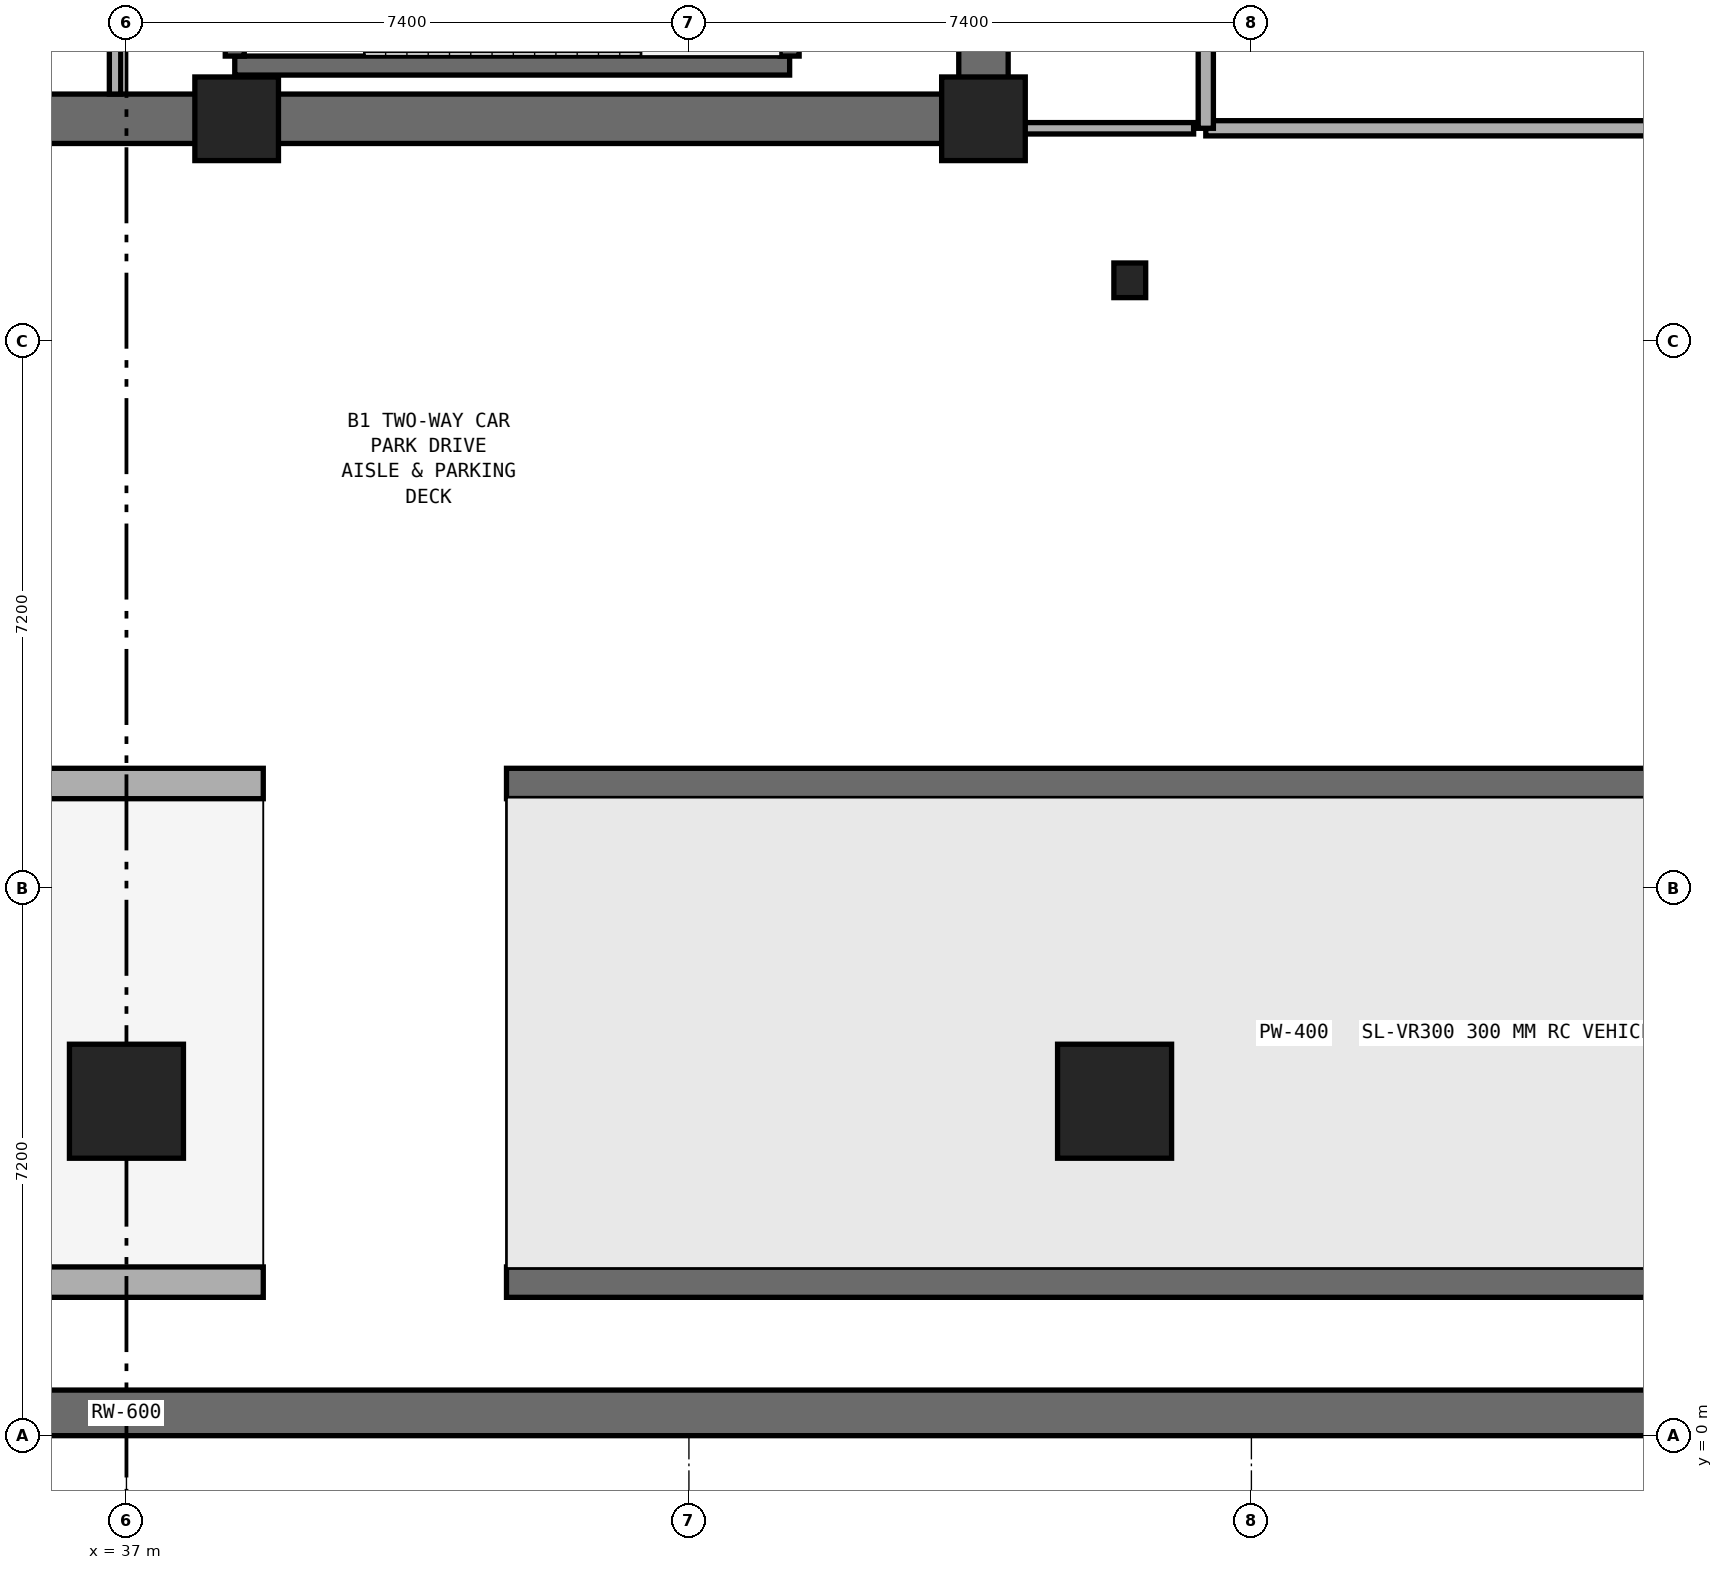
"""IFC4 building model, lengths in metres.
Left out: names, types, materials, properties, quantities, classifications, styles, units other than length and angle.
Written with IfcOpenShell. Run it as: python <this file> out.ifc"""

import sys

from ifc_helpers import new_model, si_unit, direction, frame, frame_2d, origin, origin_2d, place, context, subcontext, project, spatial, rectangle, i_section, extrude, element, save


model = new_model("IFC4")
c1 = context("Model", 3, precision=1e-05, world=origin(), true_north=direction((0.0, 1.0)))
c2 = subcontext(c1, "Body", "Model", "MODEL_VIEW")
j1 = project(units=[si_unit("LENGTHUNIT", "METRE"), si_unit("PLANEANGLEUNIT", "RADIAN")], contexts=[c1])
p1 = place(None, origin())
s1 = spatial("IfcSite", under=j1, at=p1, CompositionType="ELEMENT")
p2 = place(p1, origin())
s2 = spatial("IfcBuilding", under=s1, at=p2, CompositionType="ELEMENT")
p3 = place(p2, frame((0.0, 0.0, -4.8)))
s3 = spatial("IfcBuildingStorey", under=s2, at=p3, CompositionType="ELEMENT", Elevation=-4.8)
p4 = place(p3, frame((25.4, 17.325, 0.0), z_axis=(0.0, 0.0, 1.0), x_axis=(1.0, 0.0, 0.0)))
e1 = element("IfcWall", 1, at=p4, inside=s3, PredefinedType="SHEAR", context=c2, shape_type="SweptSolid", body=[
    extrude(rectangle(XDim=23.2, YDim=0.65, at=frame_2d((11.6, 0.0))), origin(), (0.0, 0.0, 1.0), 4.45),
])
p5 = place(p3, frame((48.275, 17.65, 0.0), z_axis=(0.0, 0.0, 1.0), x_axis=(0.0, 1.0, 0.0)))
e2 = element("IfcWall", 2, at=p5, inside=s3, PredefinedType="SHEAR", context=c2, shape_type="SweptSolid", body=[
    extrude(rectangle(XDim=15.1, YDim=0.65, at=frame_2d((7.55, 0.0))), origin(), (0.0, 0.0, 1.0), 4.45),
])
p6 = place(p5, frame((5.65, 0.0, 0.0)))
e3 = element("IfcOpeningElement", 3, at=p6, cuts=e2, PredefinedType="OPENING", context=c2, shape_type="SweptSolid", body=[
    extrude(rectangle(XDim=1.5, YDim=2.15, at=frame_2d((0.75, 1.075))), frame((0.0, 0.335, 0.0), z_axis=(0.0, -1.0, 0.0), x_axis=(1.0, 0.0, 0.0)), (0.0, 0.0, 1.0), 0.67),
])
p7 = place(p3, frame((0.0, 0.3, 0.0), z_axis=(0.0, 0.0, 1.0), x_axis=(1.0, 0.0, 0.0)))
e4 = element("IfcWall", 4, at=p7, inside=s3, PredefinedType="SOLIDWALL", context=c2, shape_type="SweptSolid", body=[
    extrude(rectangle(XDim=74.0, YDim=0.6, at=frame_2d((37.0, 0.0))), origin(), (0.0, 0.0, 1.0), 4.45),
])
for number, where, z_axis, x_axis in (
    (5, (38.45, 17.325, 0.0), (0.0, 0.0, 1.0), (1.0, 0.0, 0.0)),
    (6, (48.275, 17.325, 0.0), (0.0, 0.0, 1.0), (1.0, 0.0, 0.0)),
):
    element("IfcColumn", number, at=place(p3, frame(where, z_axis=z_axis, x_axis=x_axis)), inside=s3, PredefinedType="PILASTER", context=c2, shape_type="SweptSolid", body=[
        extrude(rectangle(XDim=1.1, YDim=1.1, at=origin_2d()), origin(), (0.0, 0.0, 1.0), 4.8),
    ])
for number, where, z_axis, x_axis in (
    (7, (37.0, 4.4, 0.0), (0.0, 0.0, 1.0), (1.0, 0.0, 0.0)),
    (8, (50.0, 4.4, 0.0), (0.0, 0.0, 1.0), (1.0, 0.0, 0.0)),
):
    element("IfcColumn", number, at=place(p3, frame(where, z_axis=z_axis, x_axis=x_axis)), inside=s3, PredefinedType="COLUMN", context=c2, shape_type="SweptSolid", body=[
        extrude(rectangle(XDim=1.5, YDim=1.5, at=origin_2d()), origin(), (0.0, 0.0, 1.0), 4.8),
    ])
p8 = place(p3, frame((50.2, 15.2, 0.0), z_axis=(0.0, 0.0, 1.0), x_axis=(1.0, 0.0, 0.0)))
e9 = element("IfcColumn", 9, at=p8, inside=s3, PredefinedType="COLUMN", context=c2, shape_type="SweptSolid", body=[
    extrude(i_section(OverallWidth=0.418, OverallDepth=0.456, WebThickness=0.042, FlangeThickness=0.067, at=origin_2d()), origin(), (0.0, 0.0, 1.0), 4.8),
])
for number, where, z_axis, x_axis in (
    (10, (9.82, 2.02, 0.0), (0.0, 0.0, 1.0), (1.0, 0.0, 0.0)),
    (11, (9.82, 8.58, 0.0), (0.0, 0.0, 1.0), (1.0, 0.0, 0.0)),
):
    element("IfcWall", number, at=place(p3, frame(where, z_axis=z_axis, x_axis=x_axis)), inside=s3, PredefinedType="SOLIDWALL", context=c2, shape_type="SweptSolid", body=[
        extrude(rectangle(XDim=28.98, YDim=0.4, at=frame_2d((14.49, 0.0))), origin(), (0.0, 0.0, 1.0), 1.18),
    ])
p9 = place(p3, frame((52.64, 2.35, 0.0), z_axis=(0.0, 0.0, 1.0), x_axis=(0.0, 1.0, 0.0)))
e12 = element("IfcWall", 12, at=p9, inside=s3, PredefinedType="SOLIDWALL", context=c2, shape_type="SweptSolid", body=[
    extrude(rectangle(XDim=5.9, YDim=0.4, at=frame_2d((2.95, 0.0))), origin(), (0.0, 0.0, 1.0), 1.504),
])
for number, where, z_axis, x_axis in (
    (13, (42.0, 2.02, 0.0), (0.0, 0.0, 1.0), (1.0, 0.0, 0.0)),
    (14, (42.0, 8.58, 0.0), (0.0, 0.0, 1.0), (1.0, 0.0, 0.0)),
):
    element("IfcWall", number, at=place(p3, frame(where, z_axis=z_axis, x_axis=x_axis)), inside=s3, PredefinedType="SOLIDWALL", context=c2, shape_type="SweptSolid", body=[
        extrude(rectangle(XDim=28.0, YDim=0.4, at=frame_2d((14.0, 0.0))), origin(), (0.0, 0.0, 1.0), 4.45),
    ])
p10 = place(p3, frame((38.425, 18.025, 0.0), z_axis=(0.0, 0.0, 1.0), x_axis=(1.0, 0.0, 0.0)))
e15 = element("IfcWall", 15, at=p10, inside=s3, PredefinedType="SHEAR", context=c2, shape_type="SweptSolid", body=[
    extrude(rectangle(XDim=7.3, YDim=0.25, at=frame_2d((3.65, 0.0))), origin(), (0.0, 0.0, 1.0), 4.45),
])
p11 = place(p3, frame((38.425, 18.15, 0.0), z_axis=(0.0, 0.0, 1.0), x_axis=(0.0, 1.0, 0.0)))
e16 = element("IfcWall", 16, at=p11, inside=s3, PredefinedType="SHEAR", context=c2, shape_type="SweptSolid", body=[
    extrude(rectangle(XDim=3.2, YDim=0.25, at=frame_2d((1.6, 0.0))), origin(), (0.0, 0.0, 1.0), 4.45),
])
p12 = place(p11, frame((0.35, 0.0, 0.0)))
e17 = element("IfcOpeningElement", 17, at=p12, cuts=e16, PredefinedType="OPENING", context=c2, shape_type="SweptSolid", body=[
    extrude(rectangle(XDim=1.1, YDim=2.15, at=frame_2d((0.55, 1.075))), frame((0.0, 0.135, 0.0), z_axis=(0.0, -1.0, 0.0), x_axis=(1.0, 0.0, 0.0)), (0.0, 0.0, 1.0), 0.27),
])
p13 = place(p3, frame((45.725, 18.15, 0.0), z_axis=(0.0, 0.0, 1.0), x_axis=(0.0, 1.0, 0.0)))
e18 = element("IfcWall", 18, at=p13, inside=s3, PredefinedType="SHEAR", context=c2, shape_type="SweptSolid", body=[
    extrude(rectangle(XDim=3.2, YDim=0.25, at=frame_2d((1.6, 0.0))), origin(), (0.0, 0.0, 1.0), 4.45),
])
p14 = place(p3, frame((36.85, 17.65, 0.0), z_axis=(0.0, 0.0, 1.0), x_axis=(0.0, 1.0, 0.0)))
e19 = element("IfcWall", 19, at=p14, inside=s3, PredefinedType="PARTITIONING", context=c2, shape_type="SweptSolid", body=[
    extrude(rectangle(XDim=2.1, YDim=0.15, at=frame_2d((1.05, 0.0))), origin(), (0.0, 0.0, 1.0), 4.45),
])
p15 = place(p3, frame((51.2, 17.2, 0.0), z_axis=(0.0, 0.0, 1.0), x_axis=(1.0, 0.0, 0.0)))
e20 = element("IfcWall", 20, at=p15, inside=s3, PredefinedType="SOLIDWALL", context=c2, shape_type="SweptSolid", body=[
    extrude(rectangle(XDim=6.0, YDim=0.2, at=frame_2d((3.0, 0.0))), origin(), (0.0, 0.0, 1.0), 4.45),
])
p16 = place(p3, frame((51.2, 17.2, 0.0), z_axis=(0.0, 0.0, 1.0), x_axis=(0.0, 1.0, 0.0)))
e21 = element("IfcWall", 21, at=p16, inside=s3, PredefinedType="SOLIDWALL", context=c2, shape_type="SweptSolid", body=[
    extrude(rectangle(XDim=6.2, YDim=0.2, at=frame_2d((3.1, 0.0))), origin(), (0.0, 0.0, 1.0), 4.45),
])
p17 = place(p16, frame((2.5, 0.0, 0.0)))
e22 = element("IfcOpeningElement", 22, at=p17, cuts=e21, PredefinedType="OPENING", context=c2, shape_type="SweptSolid", body=[
    extrude(rectangle(XDim=1.0, YDim=2.12, at=frame_2d((0.5, 1.06))), frame((0.0, 0.11, 0.0), z_axis=(0.0, -1.0, 0.0), x_axis=(1.0, 0.0, 0.0)), (0.0, 0.0, 1.0), 0.22),
])
p18 = place(p3, frame((48.74, 17.2, 0.0), z_axis=(0.0, 0.0, 1.0), x_axis=(1.0, 0.0, 0.0)))
e23 = element("IfcWall", 23, at=p18, inside=s3, PredefinedType="PARTITIONING", context=c2, shape_type="SweptSolid", body=[
    extrude(rectangle(XDim=2.3, YDim=0.15, at=frame_2d((1.15, 0.0))), origin(), (0.0, 0.0, 1.0), 4.45),
])
save(model, sys.argv[1])
